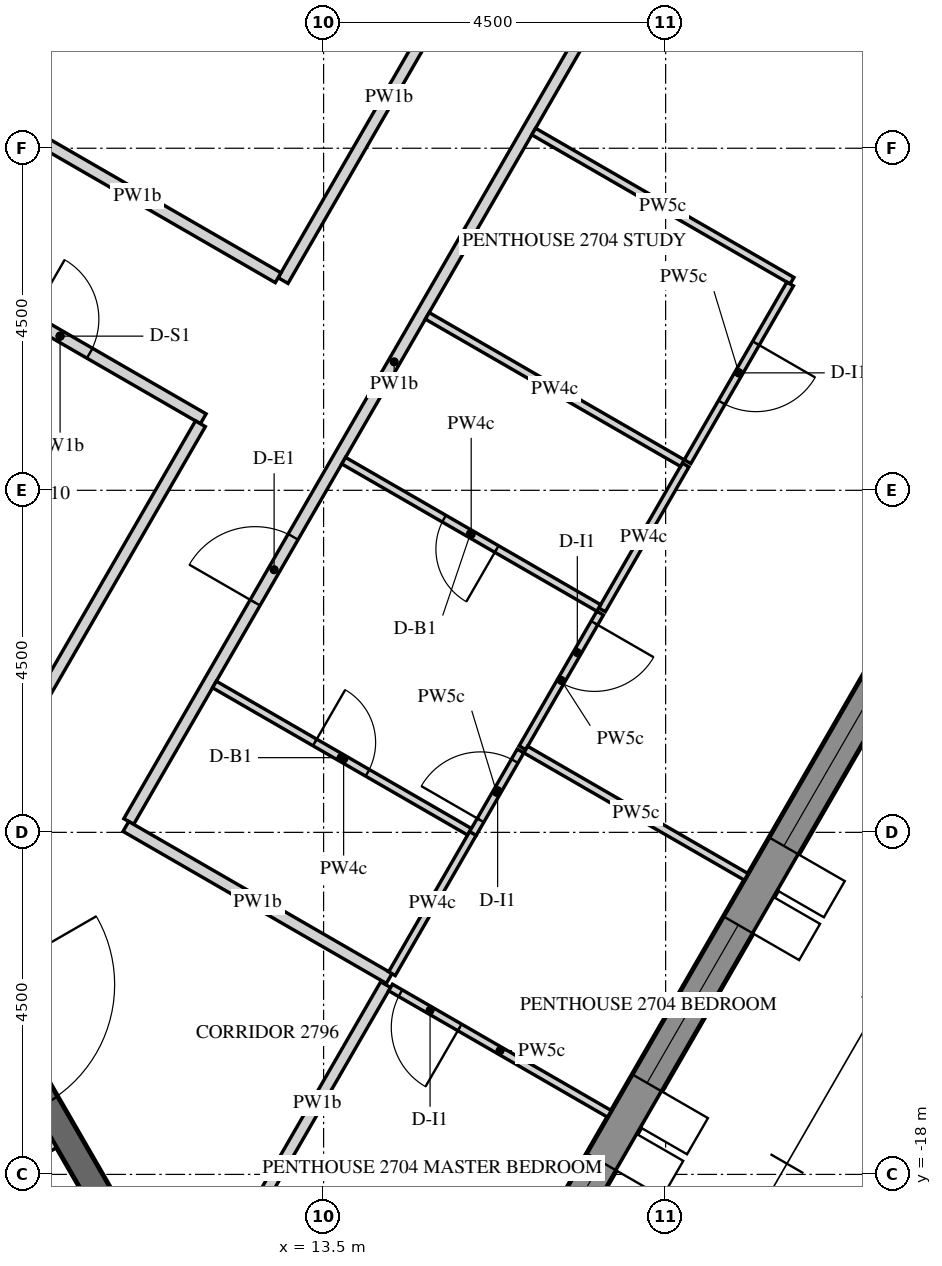
"""IFC4 building model, lengths in metres.
Left out: names, types, materials, properties, quantities, classifications, styles, units other than length and angle.
Written with IfcOpenShell. Run it as: python <this file> out.ifc"""

import sys

from ifc_helpers import new_model, si_unit, direction, frame, frame_2d, origin, place, context, subcontext, project, spatial, polyline, rectangle, outline, extrude, element, fill, save


model = new_model("IFC4")
c1 = context("Model", 3, precision=1e-05, world=origin(), true_north=direction((0.0, 1.0)))
c2 = subcontext(c1, "Body", "Model", "MODEL_VIEW")
j1 = project(units=[si_unit("LENGTHUNIT", "METRE"), si_unit("PLANEANGLEUNIT", "RADIAN")], contexts=[c1])
p1 = place(None, origin())
s1 = spatial("IfcSite", under=j1, at=p1, CompositionType="ELEMENT")
p2 = place(p1, origin())
s2 = spatial("IfcBuilding", under=s1, at=p2, CompositionType="ELEMENT")
p3 = place(p2, frame((0.0, 0.0, 349.5)))
s3 = spatial("IfcBuildingStorey", under=s2, at=p3, CompositionType="ELEMENT", Elevation=349.5)
p4 = place(p3, frame((15.273, -21.097, 0.0), z_axis=(0.0, 0.0, 1.0), x_axis=(0.499997453958, 0.866026873738, 0.0)))
e1 = element("IfcWall", 1, at=p4, inside=s3, PredefinedType="SOLIDWALL", context=c2, shape_type="SweptSolid", body=[
    extrude(outline(polyline([(-0.018, -0.225), (23.152, -0.225), (23.11, 0.225), (0.018, 0.225), (-0.018, -0.225)])), origin(), (0.0, 0.0, 1.0), 3.75),
])
p5 = place(p4, frame((1.366, 0.0, 0.3)))
e2 = element("IfcOpeningElement", 2, at=p5, cuts=e1, PredefinedType="OPENING", context=c2, shape_type="SweptSolid", body=[
    extrude(rectangle(XDim=2.4, YDim=3.0, at=frame_2d((1.2, 1.5))), frame((0.0, 0.235, 0.0), z_axis=(0.0, -1.0, 0.0), x_axis=(1.0, 0.0, 0.0)), (0.0, 0.0, 1.0), 0.47),
])
p6 = place(p4, frame((4.966, 0.0, 0.3)))
e3 = element("IfcOpeningElement", 3, at=p6, cuts=e1, PredefinedType="OPENING", context=c2, shape_type="SweptSolid", body=[
    extrude(rectangle(XDim=2.4, YDim=3.0, at=frame_2d((1.2, 1.5))), frame((0.0, 0.235, 0.0), z_axis=(0.0, -1.0, 0.0), x_axis=(1.0, 0.0, 0.0)), (0.0, 0.0, 1.0), 0.47),
])
p7 = place(p4, frame((8.566, 0.0, 0.3)))
e4 = element("IfcOpeningElement", 4, at=p7, cuts=e1, PredefinedType="OPENING", context=c2, shape_type="SweptSolid", body=[
    extrude(rectangle(XDim=2.4, YDim=3.0, at=frame_2d((1.2, 1.5))), frame((0.0, 0.235, 0.0), z_axis=(0.0, -1.0, 0.0), x_axis=(1.0, 0.0, 0.0)), (0.0, 0.0, 1.0), 0.47),
])
p8 = place(p4, frame((12.166, 0.0, 0.3)))
e5 = element("IfcOpeningElement", 5, at=p8, cuts=e1, PredefinedType="OPENING", context=c2, shape_type="SweptSolid", body=[
    extrude(rectangle(XDim=2.4, YDim=3.0, at=frame_2d((1.2, 1.5))), frame((0.0, 0.235, 0.0), z_axis=(0.0, -1.0, 0.0), x_axis=(1.0, 0.0, 0.0)), (0.0, 0.0, 1.0), 0.47),
])
p9 = place(p4, frame((15.766, 0.0, 0.3)))
e6 = element("IfcOpeningElement", 6, at=p9, cuts=e1, PredefinedType="OPENING", context=c2, shape_type="SweptSolid", body=[
    extrude(rectangle(XDim=2.4, YDim=3.0, at=frame_2d((1.2, 1.5))), frame((0.0, 0.235, 0.0), z_axis=(0.0, -1.0, 0.0), x_axis=(1.0, 0.0, 0.0)), (0.0, 0.0, 1.0), 0.47),
])
p10 = place(p4, frame((19.366, 0.0, 0.3)))
e7 = element("IfcOpeningElement", 7, at=p10, cuts=e1, PredefinedType="OPENING", context=c2, shape_type="SweptSolid", body=[
    extrude(rectangle(XDim=2.4, YDim=3.0, at=frame_2d((1.2, 1.5))), frame((0.0, 0.235, 0.0), z_axis=(0.0, -1.0, 0.0), x_axis=(1.0, 0.0, 0.0)), (0.0, 0.0, 1.0), 0.47),
])
p11 = place(p3, frame((5.673, -9.825, 0.0), z_axis=(0.0, 0.0, 1.0), x_axis=(0.499995046907, 0.866028263435, 0.0)))
e8 = element("IfcWall", 8, at=p11, inside=s3, PredefinedType="SHEAR", context=c2, shape_type="SweptSolid", body=[
    extrude(outline(polyline([(-0.101, -0.175), (11.446, -0.175), (11.244, 0.175), (0.101, 0.175), (-0.101, -0.175)])), origin(), (0.0, 0.0, 1.0), 3.75),
])
p12 = place(p11, frame((4.801, 0.0, 0.0)))
e9 = element("IfcOpeningElement", 9, at=p12, cuts=e8, PredefinedType="OPENING", context=c2, shape_type="SweptSolid", body=[
    extrude(rectangle(XDim=1.8, YDim=2.4, at=frame_2d((0.9, 1.2))), frame((0.0, 0.185, 0.0), z_axis=(0.0, -1.0, 0.0), x_axis=(1.0, 0.0, 0.0)), (0.0, 0.0, 1.0), 0.37),
])
p13 = place(p3, frame((5.773, -10.0, 0.0), z_axis=(0.0, 0.0, 1.0), x_axis=(0.500007911273, -0.866020836161, 0.0)))
e10 = element("IfcWall", 10, at=p13, inside=s3, PredefinedType="SHEAR", context=c2, shape_type="SweptSolid", body=[
    extrude(rectangle(XDim=14.51, YDim=0.35, at=frame_2d((7.255, 0.0))), origin(), (0.0, 0.0, 1.0), 3.75),
])
p14 = place(p13, frame((6.355, 0.0, 0.0)))
e11 = element("IfcOpeningElement", 11, at=p14, cuts=e10, PredefinedType="OPENING", context=c2, shape_type="SweptSolid", body=[
    extrude(rectangle(XDim=1.8, YDim=2.4, at=frame_2d((0.9, 1.2))), frame((0.0, 0.185, 0.0), z_axis=(0.0, -1.0, 0.0), x_axis=(1.0, 0.0, 0.0)), (0.0, 0.0, 1.0), 0.37),
])
p15 = place(p3, frame((8.456, -18.446, 0.0), z_axis=(0.0, 0.0, 1.0), x_axis=(0.866013532718, 0.500020560727, 0.0)))
e12 = element("IfcWall", 12, at=p15, inside=s3, PredefinedType="PARTITIONING", context=c2, shape_type="SweptSolid", body=[
    extrude(rectangle(XDim=1.725, YDim=0.15, at=frame_2d((0.863, 0.0))), origin(), (0.0, 0.0, 1.0), 2.82),
])
p16 = place(p3, frame((10.937, -13.357, 0.0), z_axis=(0.0, 0.0, 1.0), x_axis=(0.499993317597, 0.866029261837, 0.0)))
e13 = element("IfcWall", 13, at=p16, inside=s3, PredefinedType="PARTITIONING", context=c2, shape_type="SweptSolid", body=[
    extrude(rectangle(XDim=13.966, YDim=0.15, at=frame_2d((6.983, 0.0))), origin(), (0.0, 0.0, 1.0), 2.82),
])
p17 = place(p16, frame((3.325, 0.0, 0.0)))
e14 = element("IfcOpeningElement", 14, at=p17, cuts=e13, PredefinedType="OPENING", context=c2, shape_type="SweptSolid", body=[
    extrude(rectangle(XDim=1.0, YDim=2.1, at=frame_2d((0.5, 1.05))), frame((0.0, 0.085, 0.0), z_axis=(0.0, -1.0, 0.0), x_axis=(1.0, 0.0, 0.0)), (0.0, 0.0, 1.0), 0.17),
])
p18 = place(p3, frame((14.363, -15.422, 0.0), z_axis=(0.0, 0.0, 1.0), x_axis=(-0.866026010844, 0.49999894854, 0.0)))
e15 = element("IfcWall", 15, at=p18, inside=s3, PredefinedType="PARTITIONING", context=c2, shape_type="SweptSolid", body=[
    extrude(rectangle(XDim=4.0, YDim=0.15, at=frame_2d((2.0, 0.0))), origin(), (0.0, 0.0, 1.0), 2.82),
])
p19 = place(p3, frame((12.517, -18.62, 0.0), z_axis=(0.0, 0.0, 1.0), x_axis=(0.500006299954, 0.866021766474, 0.0)))
e16 = element("IfcWall", 16, at=p19, inside=s3, PredefinedType="PARTITIONING", context=c2, shape_type="SweptSolid", body=[
    extrude(rectangle(XDim=3.599, YDim=0.15, at=frame_2d((1.799, 0.0))), origin(), (0.0, 0.0, 1.0), 2.82),
])
p20 = place(p3, frame((15.757, -1.409, 0.0), z_axis=(0.0, 0.0, 1.0), x_axis=(-0.500002739321, -0.866023822231, 0.0)))
e17 = element("IfcWall", 17, at=p20, inside=s3, PredefinedType="PARTITIONING", context=c2, shape_type="SweptSolid", body=[
    extrude(rectangle(XDim=5.58, YDim=0.15, at=frame_2d((2.79, 0.0))), origin(), (0.0, 0.0, 1.0), 2.82),
])
p21 = place(p3, frame((12.902, -6.203, 0.0), z_axis=(0.0, 0.0, 1.0), x_axis=(-0.866023907196, 0.500002592159, 0.0)))
e18 = element("IfcWall", 18, at=p21, inside=s3, PredefinedType="PARTITIONING", context=c2, shape_type="SweptSolid", body=[
    extrude(rectangle(XDim=4.275, YDim=0.15, at=frame_2d((2.137, 0.0))), origin(), (0.0, 0.0, 1.0), 2.82),
])
p22 = place(p3, frame((8.15, -5.884, 0.0), z_axis=(0.0, 0.0, 1.0), x_axis=(0.866027639635, -0.499996127374, 0.0)))
e19 = element("IfcWall", 19, at=p22, inside=s3, PredefinedType="PARTITIONING", context=c2, shape_type="SweptSolid", body=[
    extrude(rectangle(XDim=4.35, YDim=0.15, at=frame_2d((2.175, 0.0))), origin(), (0.0, 0.0, 1.0), 2.82),
])
p23 = place(p22, frame((1.725, 0.0, 0.0)))
e20 = element("IfcOpeningElement", 20, at=p23, cuts=e19, PredefinedType="OPENING", context=c2, shape_type="SweptSolid", body=[
    extrude(rectangle(XDim=0.9, YDim=2.1, at=frame_2d((0.45, 1.05))), frame((0.0, 0.085, 0.0), z_axis=(0.0, -1.0, 0.0), x_axis=(1.0, 0.0, 0.0)), (0.0, 0.0, 1.0), 0.17),
])
p24 = place(p3, frame((11.879, -8.124, 0.0), z_axis=(0.0, 0.0, 1.0), x_axis=(-0.500006178143, -0.866021836803, 0.0)))
e21 = element("IfcWall", 21, at=p24, inside=s3, PredefinedType="PARTITIONING", context=c2, shape_type="SweptSolid", body=[
    extrude(rectangle(XDim=4.122, YDim=0.15, at=frame_2d((2.061, 0.0))), origin(), (0.0, 0.0, 1.0), 2.82),
])
p25 = place(p3, frame((17.138, -10.616, 0.0), z_axis=(0.0, 0.0, 1.0), x_axis=(-0.500015134316, -0.866016665807, 0.0)))
e22 = element("IfcWall", 22, at=p25, inside=s3, PredefinedType="PARTITIONING", context=c2, shape_type="SweptSolid", body=[
    extrude(rectangle(XDim=2.046, YDim=0.1, at=frame_2d((1.023, 0.0))), origin(), (0.0, 0.0, 1.0), 2.82),
])
p26 = place(p25, frame((0.15, 0.0, 0.0)))
e23 = element("IfcOpeningElement", 23, at=p26, cuts=e22, PredefinedType="OPENING", context=c2, shape_type="SweptSolid", body=[
    extrude(rectangle(XDim=0.9, YDim=2.1, at=frame_2d((0.45, 1.05))), frame((0.0, 0.06, 0.0), z_axis=(0.0, -1.0, 0.0), x_axis=(1.0, 0.0, 0.0)), (0.0, 0.0, 1.0), 0.12),
])
p27 = place(p3, frame((16.159, -12.411, 0.0), z_axis=(0.0, 0.0, 1.0), x_axis=(0.866032680314, -0.499987396469, 0.0)))
e24 = element("IfcWall", 24, at=p27, inside=s3, PredefinedType="PARTITIONING", context=c2, shape_type="SweptSolid", body=[
    extrude(rectangle(XDim=3.35, YDim=0.1, at=frame_2d((1.675, 0.0))), origin(), (0.0, 0.0, 1.0), 2.82),
])
p28 = place(p3, frame((18.263, -8.667, 0.0), z_axis=(0.0, 0.0, 1.0), x_axis=(-0.50002983664, -0.866008176907, 0.0)))
e25 = element("IfcWall", 25, at=p28, inside=s3, PredefinedType="PARTITIONING", context=c2, shape_type="SweptSolid", body=[
    extrude(rectangle(XDim=2.2, YDim=0.1, at=frame_2d((1.1, 0.0))), origin(), (0.0, 0.0, 1.0), 2.82),
])
p29 = place(p3, frame((16.264, -4.28, 0.0), z_axis=(0.0, 0.0, 1.0), x_axis=(0.866037464623, -0.499979109433, 0.0)))
e26 = element("IfcWall", 26, at=p29, inside=s3, PredefinedType="PARTITIONING", context=c2, shape_type="SweptSolid", body=[
    extrude(rectangle(XDim=3.925, YDim=0.1, at=frame_2d((1.962, 0.0))), origin(), (0.0, 0.0, 1.0), 2.82),
])
p30 = place(p3, frame((19.638, -6.286, 0.0), z_axis=(0.0, 0.0, 1.0), x_axis=(-0.500048589285, -0.86599734893, 0.0)))
e27 = element("IfcWall", 27, at=p30, inside=s3, PredefinedType="PARTITIONING", context=c2, shape_type="SweptSolid", body=[
    extrude(rectangle(XDim=2.7, YDim=0.1, at=frame_2d((1.35, 0.0))), origin(), (0.0, 0.0, 1.0), 2.82),
])
p31 = place(p30, frame((0.9, 0.0, 0.0)))
e28 = element("IfcOpeningElement", 28, at=p31, cuts=e27, PredefinedType="OPENING", context=c2, shape_type="SweptSolid", body=[
    extrude(rectangle(XDim=0.9, YDim=2.1, at=frame_2d((0.45, 1.05))), frame((0.0, 0.06, 0.0), z_axis=(0.0, -1.0, 0.0), x_axis=(1.0, 0.0, 0.0)), (0.0, 0.0, 1.0), 0.12),
])
p32 = place(p3, frame((12.064, -11.555, 0.0), z_axis=(0.0, 0.0, 1.0), x_axis=(0.866037464623, -0.499979109433, 0.0)))
e29 = element("IfcWall", 29, at=p32, inside=s3, PredefinedType="PARTITIONING", context=c2, shape_type="SweptSolid", body=[
    extrude(rectangle(XDim=3.925, YDim=0.1, at=frame_2d((1.962, 0.0))), origin(), (0.0, 0.0, 1.0), 2.82),
])
p33 = place(p32, frame((1.525, 0.0, 0.0)))
e30 = element("IfcOpeningElement", 30, at=p33, cuts=e29, PredefinedType="OPENING", context=c2, shape_type="SweptSolid", body=[
    extrude(rectangle(XDim=0.8, YDim=2.1, at=frame_2d((0.4, 1.05))), frame((0.0, 0.06, 0.0), z_axis=(0.0, -1.0, 0.0), x_axis=(1.0, 0.0, 0.0)), (0.0, 0.0, 1.0), 0.12),
])
p34 = place(p3, frame((15.462, -13.519, 0.0), z_axis=(0.0, 0.0, 1.0), x_axis=(0.50004158446, 0.866001393654, 0.0)))
e31 = element("IfcWall", 31, at=p34, inside=s3, PredefinedType="PARTITIONING", context=c2, shape_type="SweptSolid", body=[
    extrude(rectangle(XDim=1.258, YDim=0.1, at=frame_2d((0.629, 0.0))), origin(), (0.0, 0.0, 1.0), 2.82),
])
p35 = place(p34, frame((0.205, 0.0, 0.0)))
e32 = element("IfcOpeningElement", 32, at=p35, cuts=e31, PredefinedType="OPENING", context=c2, shape_type="SweptSolid", body=[
    extrude(rectangle(XDim=0.9, YDim=2.1, at=frame_2d((0.45, 1.05))), frame((0.0, 0.06, 0.0), z_axis=(0.0, -1.0, 0.0), x_axis=(1.0, 0.0, 0.0)), (0.0, 0.0, 1.0), 0.12),
])
p36 = place(p3, frame((17.12, -10.548, 0.0), z_axis=(0.0, 0.0, 1.0), x_axis=(-0.866032409438, 0.499987865656, 0.0)))
e33 = element("IfcWall", 33, at=p36, inside=s3, PredefinedType="PARTITIONING", context=c2, shape_type="SweptSolid", body=[
    extrude(rectangle(XDim=3.875, YDim=0.1, at=frame_2d((1.938, 0.0))), origin(), (0.0, 0.0, 1.0), 2.82),
])
p37 = place(p36, frame((1.55, 0.0, 0.0)))
e34 = element("IfcOpeningElement", 34, at=p37, cuts=e33, PredefinedType="OPENING", context=c2, shape_type="SweptSolid", body=[
    extrude(rectangle(XDim=0.8, YDim=2.1, at=frame_2d((0.4, 1.05))), frame((0.0, 0.06, 0.0), z_axis=(0.0, -1.0, 0.0), x_axis=(1.0, 0.0, 0.0)), (0.0, 0.0, 1.0), 0.12),
])
p38 = place(p3, frame((14.4, -15.359, 0.0), z_axis=(0.0, 0.0, 1.0), x_axis=(0.499987164874, 0.866032814021, 0.0)))
e35 = element("IfcWall", 35, at=p38, inside=s3, PredefinedType="PARTITIONING", context=c2, shape_type="SweptSolid", body=[
    extrude(rectangle(XDim=2.129, YDim=0.1, at=frame_2d((1.064, 0.0))), origin(), (0.0, 0.0, 1.0), 2.82),
])
p39 = place(p3, frame((17.261, -17.204, 0.0), z_axis=(0.0, 0.0, 1.0), x_axis=(-0.866020521143, 0.500008456887, 0.0)))
e36 = element("IfcWall", 36, at=p39, inside=s3, PredefinedType="PARTITIONING", context=c2, shape_type="SweptSolid", body=[
    extrude(rectangle(XDim=3.325, YDim=0.1, at=frame_2d((1.663, 0.0))), origin(), (0.0, 0.0, 1.0), 2.82),
])
p40 = place(p39, frame((2.275, 0.0, 0.0)))
e37 = element("IfcOpeningElement", 37, at=p40, cuts=e36, PredefinedType="OPENING", context=c2, shape_type="SweptSolid", body=[
    extrude(rectangle(XDim=0.9, YDim=2.1, at=frame_2d((0.45, 1.05))), frame((0.0, 0.06, 0.0), z_axis=(0.0, -1.0, 0.0), x_axis=(1.0, 0.0, 0.0)), (0.0, 0.0, 1.0), 0.12),
])
p41 = place(p3, frame((18.22, -8.642, 0.0), z_axis=(0.0, 0.0, 1.0), x_axis=(-0.866016658288, 0.500015147339, 0.0)))
e38 = element("IfcWall", 38, at=p41, inside=s3, PredefinedType="PARTITIONING", context=c2, shape_type="SweptSolid", body=[
    extrude(rectangle(XDim=3.875, YDim=0.1, at=frame_2d((1.938, 0.0))), origin(), (0.0, 0.0, 1.0), 2.82),
])
p42 = place(p5, frame((0.0, 0.155, 0.0)))
e39 = element("IfcWindow", 39, at=p42, inside=s3, PartitioningType="DOUBLE_PANEL_VERTICAL", PredefinedType="WINDOW", context=c2, shape_type="SweptSolid", body=[
    extrude(rectangle(XDim=2.4, YDim=3.0, at=frame_2d((1.2, 1.5))), frame((0.0, 0.03, 0.0), z_axis=(0.0, -1.0, 0.0), x_axis=(1.0, 0.0, 0.0)), (0.0, 0.0, 1.0), 0.06),
])
fill(e2, e39)
p43 = place(p6, frame((0.0, 0.155, 0.0)))
e40 = element("IfcWindow", 40, at=p43, inside=s3, PartitioningType="DOUBLE_PANEL_VERTICAL", PredefinedType="WINDOW", context=c2, shape_type="SweptSolid", body=[
    extrude(rectangle(XDim=2.4, YDim=3.0, at=frame_2d((1.2, 1.5))), frame((0.0, 0.03, 0.0), z_axis=(0.0, -1.0, 0.0), x_axis=(1.0, 0.0, 0.0)), (0.0, 0.0, 1.0), 0.06),
])
fill(e3, e40)
p44 = place(p7, frame((0.0, 0.155, 0.0)))
e41 = element("IfcWindow", 41, at=p44, inside=s3, PartitioningType="DOUBLE_PANEL_VERTICAL", PredefinedType="WINDOW", context=c2, shape_type="SweptSolid", body=[
    extrude(rectangle(XDim=2.4, YDim=3.0, at=frame_2d((1.2, 1.5))), frame((0.0, 0.03, 0.0), z_axis=(0.0, -1.0, 0.0), x_axis=(1.0, 0.0, 0.0)), (0.0, 0.0, 1.0), 0.06),
])
fill(e4, e41)
p45 = place(p17, origin())
e42 = element("IfcDoor", 42, at=p45, inside=s3, OperationType="SINGLE_SWING_LEFT", PredefinedType="DOOR", context=c2, shape_type="SweptSolid", body=[
    extrude(rectangle(XDim=1.0, YDim=2.1, at=frame_2d((0.5, 1.05))), frame((0.0, 0.025, 0.0), z_axis=(0.0, -1.0, 0.0), x_axis=(1.0, 0.0, 0.0)), (0.0, 0.0, 1.0), 0.05),
])
fill(e14, e42)
p46 = place(p33, origin())
e43 = element("IfcDoor", 43, at=p46, inside=s3, OperationType="SINGLE_SWING_RIGHT", PredefinedType="DOOR", context=c2, shape_type="SweptSolid", body=[
    extrude(rectangle(XDim=0.8, YDim=2.1, at=frame_2d((0.4, 1.05))), frame((0.0, 0.025, 0.0), z_axis=(0.0, -1.0, 0.0), x_axis=(1.0, 0.0, 0.0)), (0.0, 0.0, 1.0), 0.05),
])
fill(e30, e43)
p47 = place(p26, origin())
e44 = element("IfcDoor", 44, at=p47, inside=s3, OperationType="SINGLE_SWING_RIGHT", PredefinedType="DOOR", context=c2, shape_type="SweptSolid", body=[
    extrude(rectangle(XDim=0.9, YDim=2.1, at=frame_2d((0.45, 1.05))), frame((0.0, 0.025, 0.0), z_axis=(0.0, -1.0, 0.0), x_axis=(1.0, 0.0, 0.0)), (0.0, 0.0, 1.0), 0.05),
])
fill(e23, e44)
p48 = place(p40, origin())
e45 = element("IfcDoor", 45, at=p48, inside=s3, OperationType="SINGLE_SWING_RIGHT", PredefinedType="DOOR", context=c2, shape_type="SweptSolid", body=[
    extrude(rectangle(XDim=0.9, YDim=2.1, at=frame_2d((0.45, 1.05))), frame((0.0, 0.025, 0.0), z_axis=(0.0, -1.0, 0.0), x_axis=(1.0, 0.0, 0.0)), (0.0, 0.0, 1.0), 0.05),
])
fill(e37, e45)
p49 = place(p35, origin())
e46 = element("IfcDoor", 46, at=p49, inside=s3, OperationType="SINGLE_SWING_LEFT", PredefinedType="DOOR", context=c2, shape_type="SweptSolid", body=[
    extrude(rectangle(XDim=0.9, YDim=2.1, at=frame_2d((0.45, 1.05))), frame((0.0, 0.025, 0.0), z_axis=(0.0, -1.0, 0.0), x_axis=(1.0, 0.0, 0.0)), (0.0, 0.0, 1.0), 0.05),
])
fill(e32, e46)
p50 = place(p37, origin())
e47 = element("IfcDoor", 47, at=p50, inside=s3, OperationType="SINGLE_SWING_LEFT", PredefinedType="DOOR", context=c2, shape_type="SweptSolid", body=[
    extrude(rectangle(XDim=0.8, YDim=2.1, at=frame_2d((0.4, 1.05))), frame((0.0, 0.025, 0.0), z_axis=(0.0, -1.0, 0.0), x_axis=(1.0, 0.0, 0.0)), (0.0, 0.0, 1.0), 0.05),
])
fill(e34, e47)
p51 = place(p31, origin())
e48 = element("IfcDoor", 48, at=p51, inside=s3, OperationType="SINGLE_SWING_LEFT", PredefinedType="DOOR", context=c2, shape_type="SweptSolid", body=[
    extrude(rectangle(XDim=0.9, YDim=2.1, at=frame_2d((0.45, 1.05))), frame((0.0, 0.025, 0.0), z_axis=(0.0, -1.0, 0.0), x_axis=(1.0, 0.0, 0.0)), (0.0, 0.0, 1.0), 0.05),
])
fill(e28, e48)
p52 = place(p23, origin())
e49 = element("IfcDoor", 49, at=p52, inside=s3, OperationType="SINGLE_SWING_LEFT", PredefinedType="DOOR", context=c2, shape_type="SweptSolid", body=[
    extrude(rectangle(XDim=0.9, YDim=2.1, at=frame_2d((0.45, 1.05))), frame((0.0, 0.025, 0.0), z_axis=(0.0, -1.0, 0.0), x_axis=(1.0, 0.0, 0.0)), (0.0, 0.0, 1.0), 0.05),
])
fill(e20, e49)
save(model, sys.argv[1])
